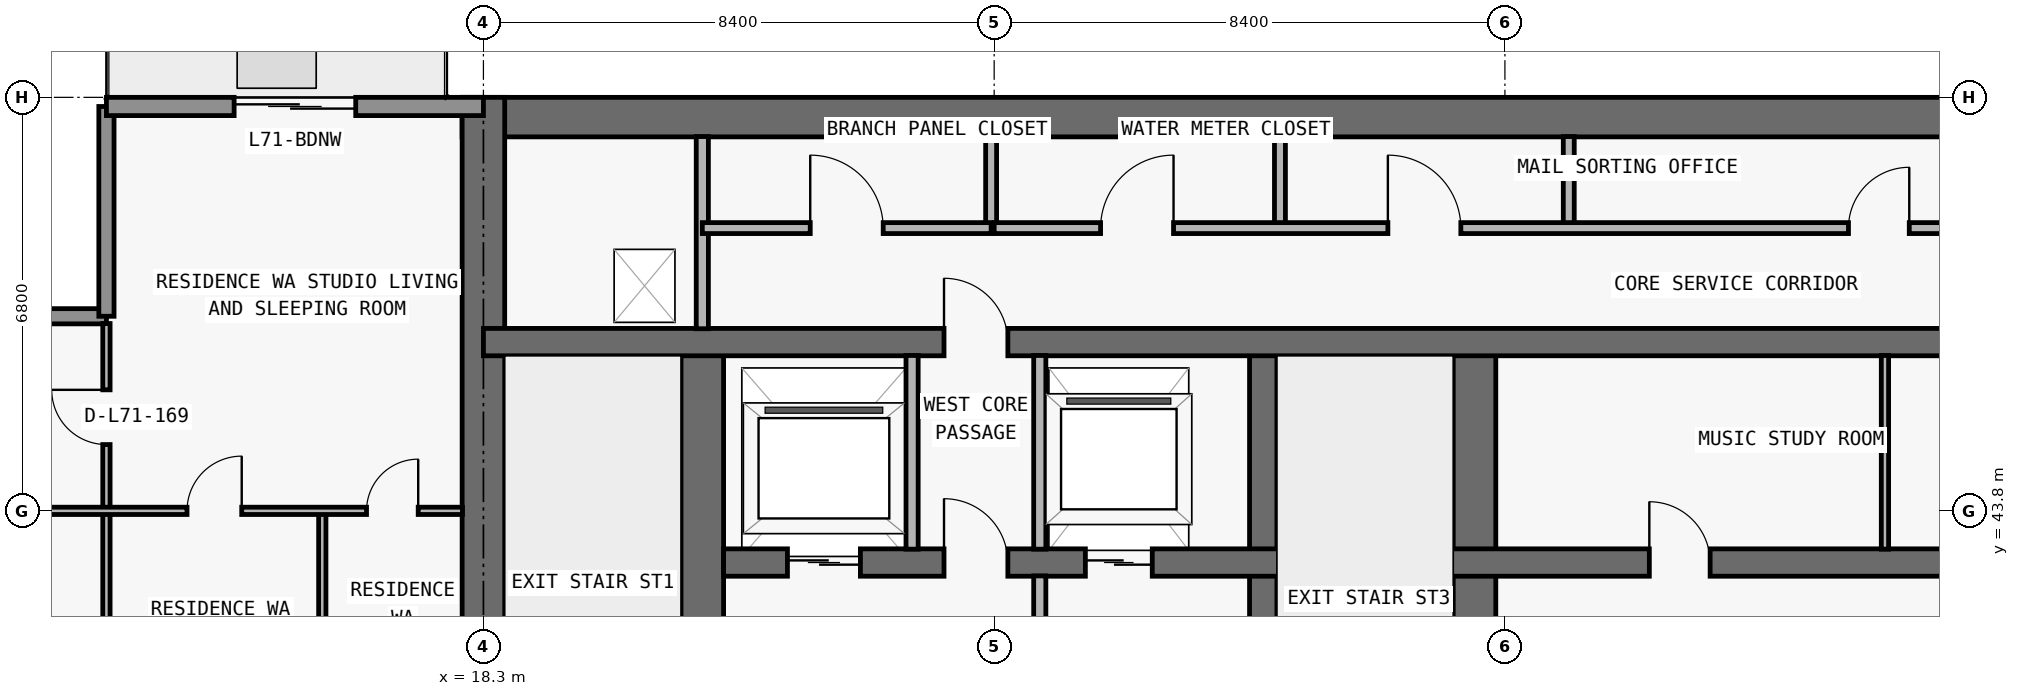
"""IFC4 building model, lengths in metres.
Left out: names, types, materials, properties, quantities, classifications, styles, units other than length and angle.
Written with IfcOpenShell. Run it as: python <this file> out.ifc"""

import sys

from ifc_helpers import new_model, si_unit, direction, frame, frame_2d, origin, place, context, subcontext, project, spatial, rectangle, extrude, element, fill, save


model = new_model("IFC4")
c1 = context("Model", 3, precision=1e-05, world=origin(), true_north=direction((0.0, 1.0)))
c2 = subcontext(c1, "Body", "Model", "MODEL_VIEW")
j1 = project(units=[si_unit("LENGTHUNIT", "METRE"), si_unit("PLANEANGLEUNIT", "RADIAN")], contexts=[c1])
p1 = place(None, origin())
s1 = spatial("IfcSite", under=j1, at=p1, CompositionType="ELEMENT")
p2 = place(p1, origin())
s2 = spatial("IfcBuilding", under=s1, at=p2, CompositionType="ELEMENT")
p3 = place(p2, frame((0.0, 0.0, 252.9)))
s3 = spatial("IfcBuildingStorey", under=s2, at=p3, CompositionType="ELEMENT", Elevation=252.9)
p4 = place(p3, frame((17.95, 50.275, 0.0), z_axis=(0.0, 0.0, 1.0), x_axis=(1.0, 0.0, 0.0)))
e1 = element("IfcWall", 1, at=p4, inside=s3, PredefinedType="SHEAR", context=c2, shape_type="SweptSolid", body=[
    extrude(rectangle(XDim=41.9, YDim=0.65, at=frame_2d((20.95, 0.0))), origin(), (0.0, 0.0, 1.0), 3.05),
])
p5 = place(p3, frame((18.3, 36.65, 0.0), z_axis=(0.0, 0.0, 1.0), x_axis=(0.0, 1.0, 0.0)))
e2 = element("IfcWall", 2, at=p5, inside=s3, PredefinedType="SHEAR", context=c2, shape_type="SweptSolid", body=[
    extrude(rectangle(XDim=13.95, YDim=0.7, at=frame_2d((6.975, 0.0))), origin(), (0.0, 0.0, 1.0), 3.05),
])
p6 = place(p3, frame((21.9, 37.0, 0.0), z_axis=(0.0, 0.0, 1.0), x_axis=(0.0, 1.0, 0.0)))
e3 = element("IfcWall", 3, at=p6, inside=s3, PredefinedType="SHEAR", context=c2, shape_type="SweptSolid", body=[
    extrude(rectangle(XDim=9.575, YDim=0.7, at=frame_2d((4.788, 0.0))), origin(), (0.0, 0.0, 1.0), 3.05),
])
p7 = place(p6, frame((0.55, 0.0, 0.0)))
e4 = element("IfcOpeningElement", 4, at=p7, cuts=e3, PredefinedType="OPENING", context=c2, shape_type="SweptSolid", body=[
    extrude(rectangle(XDim=1.1, YDim=2.15, at=frame_2d((0.55, 1.075))), frame((0.0, 0.36, 0.0), z_axis=(0.0, -1.0, 0.0), x_axis=(1.0, 0.0, 0.0)), (0.0, 0.0, 1.0), 0.72),
])
p8 = place(p3, frame((31.125, 37.0, 0.0), z_axis=(0.0, 0.0, 1.0), x_axis=(0.0, 1.0, 0.0)))
e5 = element("IfcWall", 5, at=p8, inside=s3, PredefinedType="SHEAR", context=c2, shape_type="SweptSolid", body=[
    extrude(rectangle(XDim=9.575, YDim=0.45, at=frame_2d((4.788, 0.0))), origin(), (0.0, 0.0, 1.0), 3.05),
])
p9 = place(p3, frame((34.6, 37.0, 0.0), z_axis=(0.0, 0.0, 1.0), x_axis=(0.0, 1.0, 0.0)))
e6 = element("IfcWall", 6, at=p9, inside=s3, PredefinedType="SHEAR", context=c2, shape_type="SweptSolid", body=[
    extrude(rectangle(XDim=9.575, YDim=0.7, at=frame_2d((4.788, 0.0))), origin(), (0.0, 0.0, 1.0), 3.05),
])
p10 = place(p3, frame((22.25, 42.95, 0.0), z_axis=(0.0, 0.0, 1.0), x_axis=(1.0, 0.0, 0.0)))
e7 = element("IfcWall", 7, at=p10, inside=s3, PredefinedType="SHEAR", context=c2, shape_type="SweptSolid", body=[
    extrude(rectangle(XDim=33.3, YDim=0.45, at=frame_2d((16.65, 0.0))), origin(), (0.0, 0.0, 1.0), 3.05),
])
p11 = place(p10, frame((1.05, 0.0, 0.0)))
e8 = element("IfcOpeningElement", 8, at=p11, cuts=e7, PredefinedType="OPENING", context=c2, shape_type="SweptSolid", body=[
    extrude(rectangle(XDim=1.2, YDim=2.2, at=frame_2d((0.6, 1.1))), frame((0.0, 0.235, 0.0), z_axis=(0.0, -1.0, 0.0), x_axis=(1.0, 0.0, 0.0)), (0.0, 0.0, 1.0), 0.47),
])
p12 = place(p10, frame((31.05, 0.0, 0.0)))
e9 = element("IfcOpeningElement", 9, at=p12, cuts=e7, PredefinedType="OPENING", context=c2, shape_type="SweptSolid", body=[
    extrude(rectangle(XDim=1.2, YDim=2.2, at=frame_2d((0.6, 1.1))), frame((0.0, 0.235, 0.0), z_axis=(0.0, -1.0, 0.0), x_axis=(1.0, 0.0, 0.0)), (0.0, 0.0, 1.0), 0.47),
])
p13 = place(p10, frame((26.45, 0.0, 0.0)))
e10 = element("IfcOpeningElement", 10, at=p13, cuts=e7, PredefinedType="OPENING", context=c2, shape_type="SweptSolid", body=[
    extrude(rectangle(XDim=1.1, YDim=2.2, at=frame_2d((0.55, 1.1))), frame((0.0, 0.235, 0.0), z_axis=(0.0, -1.0, 0.0), x_axis=(1.0, 0.0, 0.0)), (0.0, 0.0, 1.0), 0.47),
])
p14 = place(p10, frame((5.95, 0.0, 0.0)))
e11 = element("IfcOpeningElement", 11, at=p14, cuts=e7, PredefinedType="OPENING", context=c2, shape_type="SweptSolid", body=[
    extrude(rectangle(XDim=1.1, YDim=2.2, at=frame_2d((0.55, 1.1))), frame((0.0, 0.235, 0.0), z_axis=(0.0, -1.0, 0.0), x_axis=(1.0, 0.0, 0.0)), (0.0, 0.0, 1.0), 0.47),
])
p15 = place(p10, frame((3.625, 0.0, 0.0)))
e12 = element("IfcOpeningElement", 12, at=p15, cuts=e7, PredefinedType="OPENING", context=c2, shape_type="SweptSolid", body=[
    extrude(rectangle(XDim=1.05, YDim=2.15, at=frame_2d((0.525, 1.075))), frame((0.0, 0.235, 0.0), z_axis=(0.0, -1.0, 0.0), x_axis=(1.0, 0.0, 0.0)), (0.0, 0.0, 1.0), 0.47),
])
p16 = place(p10, frame((28.675, 0.0, 0.0)))
e13 = element("IfcOpeningElement", 13, at=p16, cuts=e7, PredefinedType="OPENING", context=c2, shape_type="SweptSolid", body=[
    extrude(rectangle(XDim=1.05, YDim=2.15, at=frame_2d((0.525, 1.075))), frame((0.0, 0.235, 0.0), z_axis=(0.0, -1.0, 0.0), x_axis=(1.0, 0.0, 0.0)), (0.0, 0.0, 1.0), 0.47),
])
p17 = place(p10, frame((15.225, 0.0, 0.0)))
e14 = element("IfcOpeningElement", 14, at=p17, cuts=e7, PredefinedType="OPENING", context=c2, shape_type="SweptSolid", body=[
    extrude(rectangle(XDim=1.0, YDim=2.2, at=frame_2d((0.5, 1.1))), frame((0.0, 0.235, 0.0), z_axis=(0.0, -1.0, 0.0), x_axis=(1.0, 0.0, 0.0)), (0.0, 0.0, 1.0), 0.47),
])
p18 = place(p10, frame((21.975, 0.0, 0.0)))
e15 = element("IfcOpeningElement", 15, at=p18, cuts=e7, PredefinedType="OPENING", context=c2, shape_type="SweptSolid", body=[
    extrude(rectangle(XDim=1.0, YDim=2.2, at=frame_2d((0.5, 1.1))), frame((0.0, 0.235, 0.0), z_axis=(0.0, -1.0, 0.0), x_axis=(1.0, 0.0, 0.0)), (0.0, 0.0, 1.0), 0.47),
])
p19 = place(p3, frame((18.3, 46.575, 0.0), z_axis=(0.0, 0.0, 1.0), x_axis=(1.0, 0.0, 0.0)))
e16 = element("IfcWall", 16, at=p19, inside=s3, PredefinedType="SHEAR", context=c2, shape_type="SweptSolid", body=[
    extrude(rectangle(XDim=41.2, YDim=0.45, at=frame_2d((20.6, 0.0))), origin(), (0.0, 0.0, 1.0), 3.05),
])
p20 = place(p19, frame((7.575, 0.0, 0.0)))
e17 = element("IfcOpeningElement", 17, at=p20, cuts=e16, PredefinedType="OPENING", context=c2, shape_type="SweptSolid", body=[
    extrude(rectangle(XDim=1.05, YDim=2.15, at=frame_2d((0.525, 1.075))), frame((0.0, 0.235, 0.0), z_axis=(0.0, -1.0, 0.0), x_axis=(1.0, 0.0, 0.0)), (0.0, 0.0, 1.0), 0.47),
])
p21 = place(p19, frame((32.625, 0.0, 0.0)))
e18 = element("IfcOpeningElement", 18, at=p21, cuts=e16, PredefinedType="OPENING", context=c2, shape_type="SweptSolid", body=[
    extrude(rectangle(XDim=1.05, YDim=2.15, at=frame_2d((0.525, 1.075))), frame((0.0, 0.235, 0.0), z_axis=(0.0, -1.0, 0.0), x_axis=(1.0, 0.0, 0.0)), (0.0, 0.0, 1.0), 0.47),
])
p22 = place(p3, frame((8.25, 47.0, 0.0), z_axis=(0.0, 0.0, 1.0), x_axis=(1.0, 0.0, 0.0)))
e19 = element("IfcWall", 19, at=p22, inside=s3, PredefinedType="ELEMENTEDWALL", context=c2, shape_type="SweptSolid", body=[
    extrude(rectangle(XDim=3.85, YDim=0.25, at=frame_2d((1.925, 0.0))), origin(), (0.0, 0.0, 1.0), 3.05),
])
p23 = place(p3, frame((12.1, 47.0, 0.0), z_axis=(0.0, 0.0, 1.0), x_axis=(0.0, 1.0, 0.0)))
e20 = element("IfcWall", 20, at=p23, inside=s3, PredefinedType="ELEMENTEDWALL", context=c2, shape_type="SweptSolid", body=[
    extrude(rectangle(XDim=3.45, YDim=0.25, at=frame_2d((1.725, 0.0))), origin(), (0.0, 0.0, 1.0), 3.05),
])
p24 = place(p3, frame((12.1, 50.45, 0.0), z_axis=(0.0, 0.0, 1.0), x_axis=(1.0, 0.0, 0.0)))
e21 = element("IfcWall", 21, at=p24, inside=s3, PredefinedType="STANDARD", context=c2, shape_type="SweptSolid", body=[
    extrude(rectangle(XDim=6.2, YDim=0.3, at=frame_2d((3.1, 0.0))), origin(), (0.0, 0.0, 1.0), 3.05),
])
p25 = place(p24, frame((2.1, 0.0, 0.0)))
e22 = element("IfcOpeningElement", 22, at=p25, cuts=e21, PredefinedType="OPENING", context=c2, shape_type="SweptSolid", body=[
    extrude(rectangle(XDim=2.0, YDim=2.3, at=frame_2d((1.0, 1.15))), frame((0.0, 0.16, 0.0), z_axis=(0.0, -1.0, 0.0), x_axis=(1.0, 0.0, 0.0)), (0.0, 0.0, 1.0), 0.32),
])
p26 = place(p3, frame((12.1, 37.005, 0.0), z_axis=(0.0, 0.0, 1.0), x_axis=(0.0, 1.0, 0.0)))
e23 = element("IfcWall", 23, at=p26, inside=s3, PredefinedType="PARTITIONING", context=c2, shape_type="SweptSolid", body=[
    extrude(rectangle(XDim=9.875, YDim=0.12, at=frame_2d((4.938, 0.0))), origin(), (0.0, 0.0, 1.0), 3.05),
])
p27 = place(p26, frame((2.948, 0.0, 0.0)))
e24 = element("IfcOpeningElement", 24, at=p27, cuts=e23, PredefinedType="OPENING", context=c2, shape_type="SweptSolid", body=[
    extrude(rectangle(XDim=0.9, YDim=2.15, at=frame_2d((0.45, 1.075))), frame((0.0, 0.07, 0.0), z_axis=(0.0, -1.0, 0.0), x_axis=(1.0, 0.0, 0.0)), (0.0, 0.0, 1.0), 0.14),
])
p28 = place(p26, frame((7.885, 0.0, 0.0)))
e25 = element("IfcOpeningElement", 25, at=p28, cuts=e23, PredefinedType="OPENING", context=c2, shape_type="SweptSolid", body=[
    extrude(rectangle(XDim=0.9, YDim=2.15, at=frame_2d((0.45, 1.075))), frame((0.0, 0.07, 0.0), z_axis=(0.0, -1.0, 0.0), x_axis=(1.0, 0.0, 0.0)), (0.0, 0.0, 1.0), 0.14),
])
p29 = place(p3, frame((15.65, 37.0, 0.0), z_axis=(0.0, 0.0, 1.0), x_axis=(0.0, 1.0, 0.0)))
e26 = element("IfcWall", 26, at=p29, inside=s3, PredefinedType="PARTITIONING", context=c2, shape_type="SweptSolid", body=[
    extrude(rectangle(XDim=6.8, YDim=0.12, at=frame_2d((3.4, 0.0))), origin(), (0.0, 0.0, 1.0), 3.05),
])
p30 = place(p29, frame((1.207, 0.0, 0.0)))
e27 = element("IfcOpeningElement", 27, at=p30, cuts=e26, PredefinedType="OPENING", context=c2, shape_type="SweptSolid", body=[
    extrude(rectangle(XDim=0.85, YDim=2.1, at=frame_2d((0.425, 1.05))), frame((0.0, 0.07, 0.0), z_axis=(0.0, -1.0, 0.0), x_axis=(1.0, 0.0, 0.0)), (0.0, 0.0, 1.0), 0.14),
])
p31 = place(p3, frame((21.9, 46.795, 0.0), z_axis=(0.0, 0.0, 1.0), x_axis=(0.0, 1.0, 0.0)))
e28 = element("IfcWall", 28, at=p31, inside=s3, PredefinedType="PARTITIONING", context=c2, shape_type="SweptSolid", body=[
    extrude(rectangle(XDim=3.16, YDim=0.2, at=frame_2d((1.58, 0.0))), origin(), (0.0, 0.0, 1.0), 3.05),
])
p32 = place(p3, frame((25.35, 43.17, 0.0), z_axis=(0.0, 0.0, 1.0), x_axis=(0.0, 1.0, 0.0)))
e29 = element("IfcWall", 29, at=p32, inside=s3, PredefinedType="PARTITIONING", context=c2, shape_type="SweptSolid", body=[
    extrude(rectangle(XDim=3.185, YDim=0.2, at=frame_2d((1.593, 0.0))), origin(), (0.0, 0.0, 1.0), 3.05),
])
p33 = place(p3, frame((26.65, 48.45, 0.0), z_axis=(0.0, 0.0, 1.0), x_axis=(0.0, 1.0, 0.0)))
e30 = element("IfcWall", 30, at=p33, inside=s3, PredefinedType="PARTITIONING", context=c2, shape_type="SweptSolid", body=[
    extrude(rectangle(XDim=1.505, YDim=0.18, at=frame_2d((0.752, 0.0))), origin(), (0.0, 0.0, 1.0), 3.05),
])
p34 = place(p3, frame((27.45, 37.345, 0.0), z_axis=(0.0, 0.0, 1.0), x_axis=(0.0, 1.0, 0.0)))
e31 = element("IfcWall", 31, at=p34, inside=s3, PredefinedType="PARTITIONING", context=c2, shape_type="SweptSolid", body=[
    extrude(rectangle(XDim=5.385, YDim=0.2, at=frame_2d((2.692, 0.0))), origin(), (0.0, 0.0, 1.0), 3.05),
])
p35 = place(p3, frame((27.45, 43.17, 0.0), z_axis=(0.0, 0.0, 1.0), x_axis=(0.0, 1.0, 0.0)))
e32 = element("IfcWall", 32, at=p35, inside=s3, PredefinedType="PARTITIONING", context=c2, shape_type="SweptSolid", body=[
    extrude(rectangle(XDim=3.185, YDim=0.2, at=frame_2d((1.593, 0.0))), origin(), (0.0, 0.0, 1.0), 3.05),
])
for number, where, z_axis, x_axis in (
    (33, (31.4, 48.45, 0.0), (0.0, 0.0, 1.0), (0.0, 1.0, 0.0)),
    (34, (36.15, 48.45, 0.0), (0.0, 0.0, 1.0), (0.0, 1.0, 0.0)),
):
    element("IfcWall", number, at=place(p3, frame(where, z_axis=z_axis, x_axis=x_axis)), inside=s3, PredefinedType="PARTITIONING", context=c2, shape_type="SweptSolid", body=[
        extrude(rectangle(XDim=1.505, YDim=0.18, at=frame_2d((0.752, 0.0))), origin(), (0.0, 0.0, 1.0), 3.05),
    ])
p36 = place(p3, frame((41.35, 43.17, 0.0), z_axis=(0.0, 0.0, 1.0), x_axis=(0.0, 1.0, 0.0)))
e35 = element("IfcWall", 35, at=p36, inside=s3, PredefinedType="PARTITIONING", context=c2, shape_type="SweptSolid", body=[
    extrude(rectangle(XDim=3.185, YDim=0.12, at=frame_2d((1.593, 0.0))), origin(), (0.0, 0.0, 1.0), 3.05),
])
p37 = place(p3, frame((8.395, 43.8, 0.0), z_axis=(0.0, 0.0, 1.0), x_axis=(1.0, 0.0, 0.0)))
e36 = element("IfcWall", 36, at=p37, inside=s3, PredefinedType="PARTITIONING", context=c2, shape_type="SweptSolid", body=[
    extrude(rectangle(XDim=9.56, YDim=0.12, at=frame_2d((4.78, 0.0))), origin(), (0.0, 0.0, 1.0), 2.418),
])
p38 = place(p37, frame((5.03, 0.0, 0.0)))
e37 = element("IfcOpeningElement", 37, at=p38, cuts=e36, PredefinedType="OPENING", context=c2, shape_type="SweptSolid", body=[
    extrude(rectangle(XDim=0.9, YDim=2.15, at=frame_2d((0.45, 1.075))), frame((0.0, 0.07, 0.0), z_axis=(0.0, -1.0, 0.0), x_axis=(1.0, 0.0, 0.0)), (0.0, 0.0, 1.0), 0.14),
])
p39 = place(p37, frame((7.982, 0.0, 0.0)))
e38 = element("IfcOpeningElement", 38, at=p39, cuts=e36, PredefinedType="OPENING", context=c2, shape_type="SweptSolid", body=[
    extrude(rectangle(XDim=0.85, YDim=2.1, at=frame_2d((0.425, 1.05))), frame((0.0, 0.07, 0.0), z_axis=(0.0, -1.0, 0.0), x_axis=(1.0, 0.0, 0.0)), (0.0, 0.0, 1.0), 0.14),
])
p40 = place(p3, frame((21.9, 48.45, 0.0), z_axis=(0.0, 0.0, 1.0), x_axis=(1.0, 0.0, 0.0)))
e39 = element("IfcWall", 39, at=p40, inside=s3, PredefinedType="PARTITIONING", context=c2, shape_type="SweptSolid", body=[
    extrude(rectangle(XDim=4.75, YDim=0.18, at=frame_2d((2.375, 0.0))), origin(), (0.0, 0.0, 1.0), 3.05),
])
p41 = place(p40, frame((1.775, 0.0, 0.0)))
e40 = element("IfcOpeningElement", 40, at=p41, cuts=e39, PredefinedType="OPENING", context=c2, shape_type="SweptSolid", body=[
    extrude(rectangle(XDim=1.2, YDim=2.2, at=frame_2d((0.6, 1.1))), frame((0.0, 0.1, 0.0), z_axis=(0.0, -1.0, 0.0), x_axis=(1.0, 0.0, 0.0)), (0.0, 0.0, 1.0), 0.2),
])
p42 = place(p3, frame((26.7, 48.45, 0.0), z_axis=(0.0, 0.0, 1.0), x_axis=(1.0, 0.0, 0.0)))
e41 = element("IfcWall", 41, at=p42, inside=s3, PredefinedType="PARTITIONING", context=c2, shape_type="SweptSolid", body=[
    extrude(rectangle(XDim=29.2, YDim=0.18, at=frame_2d((14.6, 0.0))), origin(), (0.0, 0.0, 1.0), 3.05),
])
p43 = place(p42, frame((1.75, 0.0, 0.0)))
e42 = element("IfcOpeningElement", 42, at=p43, cuts=e41, PredefinedType="OPENING", context=c2, shape_type="SweptSolid", body=[
    extrude(rectangle(XDim=1.2, YDim=2.2, at=frame_2d((0.6, 1.1))), frame((0.0, 0.1, 0.0), z_axis=(0.0, -1.0, 0.0), x_axis=(1.0, 0.0, 0.0)), (0.0, 0.0, 1.0), 0.2),
])
p44 = place(p42, frame((6.475, 0.0, 0.0)))
e43 = element("IfcOpeningElement", 43, at=p44, cuts=e41, PredefinedType="OPENING", context=c2, shape_type="SweptSolid", body=[
    extrude(rectangle(XDim=1.2, YDim=2.2, at=frame_2d((0.6, 1.1))), frame((0.0, 0.1, 0.0), z_axis=(0.0, -1.0, 0.0), x_axis=(1.0, 0.0, 0.0)), (0.0, 0.0, 1.0), 0.2),
])
p45 = place(p42, frame((14.05, 0.0, 0.0)))
e44 = element("IfcOpeningElement", 44, at=p45, cuts=e41, PredefinedType="OPENING", context=c2, shape_type="SweptSolid", body=[
    extrude(rectangle(XDim=1.0, YDim=2.2, at=frame_2d((0.5, 1.1))), frame((0.0, 0.1, 0.0), z_axis=(0.0, -1.0, 0.0), x_axis=(1.0, 0.0, 0.0)), (0.0, 0.0, 1.0), 0.2),
])
p46 = place(p42, frame((21.425, 0.0, 0.0)))
e45 = element("IfcOpeningElement", 45, at=p46, cuts=e41, PredefinedType="OPENING", context=c2, shape_type="SweptSolid", body=[
    extrude(rectangle(XDim=1.2, YDim=2.2, at=frame_2d((0.6, 1.1))), frame((0.0, 0.1, 0.0), z_axis=(0.0, -1.0, 0.0), x_axis=(1.0, 0.0, 0.0)), (0.0, 0.0, 1.0), 0.2),
])
p47 = place(p42, frame((26.375, 0.0, 0.0)))
e46 = element("IfcOpeningElement", 46, at=p47, cuts=e41, PredefinedType="OPENING", context=c2, shape_type="SweptSolid", body=[
    extrude(rectangle(XDim=0.85, YDim=2.1, at=frame_2d((0.425, 1.05))), frame((0.0, 0.1, 0.0), z_axis=(0.0, -1.0, 0.0), x_axis=(1.0, 0.0, 0.0)), (0.0, 0.0, 1.0), 0.2),
])
p48 = place(p25, origin())
e47 = element("IfcDoor", 47, at=p48, inside=s3, OperationType="DOUBLE_DOOR_SLIDING", PredefinedType="DOOR", context=c2, shape_type="SweptSolid", body=[
    extrude(rectangle(XDim=2.0, YDim=2.3, at=frame_2d((1.0, 1.15))), frame((0.0, 0.025, 0.0), z_axis=(0.0, -1.0, 0.0), x_axis=(1.0, 0.0, 0.0)), (0.0, 0.0, 1.0), 0.05),
])
fill(e22, e47)
p49 = place(p11, origin())
e48 = element("IfcDoor", 48, at=p49, inside=s3, OperationType="DOUBLE_DOOR_SLIDING", PredefinedType="DOOR", context=c2, shape_type="SweptSolid", body=[
    extrude(rectangle(XDim=1.2, YDim=2.2, at=frame_2d((0.6, 1.1))), frame((0.0, 0.025, 0.0), z_axis=(0.0, -1.0, 0.0), x_axis=(1.0, 0.0, 0.0)), (0.0, 0.0, 1.0), 0.05),
])
fill(e8, e48)
p50 = place(p14, origin())
e49 = element("IfcDoor", 49, at=p50, inside=s3, OperationType="DOUBLE_DOOR_SLIDING", PredefinedType="DOOR", context=c2, shape_type="SweptSolid", body=[
    extrude(rectangle(XDim=1.1, YDim=2.2, at=frame_2d((0.55, 1.1))), frame((0.0, 0.025, 0.0), z_axis=(0.0, -1.0, 0.0), x_axis=(1.0, 0.0, 0.0)), (0.0, 0.0, 1.0), 0.05),
])
fill(e11, e49)
p51 = place(p15, origin())
e50 = element("IfcDoor", 50, at=p51, inside=s3, OperationType="SINGLE_SWING_LEFT", PredefinedType="DOOR", context=c2, shape_type="SweptSolid", body=[
    extrude(rectangle(XDim=1.05, YDim=2.15, at=frame_2d((0.525, 1.075))), frame((0.0, 0.025, 0.0), z_axis=(0.0, -1.0, 0.0), x_axis=(1.0, 0.0, 0.0)), (0.0, 0.0, 1.0), 0.05),
])
fill(e12, e50)
p52 = place(p17, origin())
e51 = element("IfcDoor", 51, at=p52, inside=s3, OperationType="SINGLE_SWING_LEFT", PredefinedType="DOOR", context=c2, shape_type="SweptSolid", body=[
    extrude(rectangle(XDim=1.0, YDim=2.2, at=frame_2d((0.5, 1.1))), frame((0.0, 0.025, 0.0), z_axis=(0.0, -1.0, 0.0), x_axis=(1.0, 0.0, 0.0)), (0.0, 0.0, 1.0), 0.05),
])
fill(e14, e51)
p53 = place(p20, origin())
e52 = element("IfcDoor", 52, at=p53, inside=s3, OperationType="SINGLE_SWING_LEFT", PredefinedType="DOOR", context=c2, shape_type="SweptSolid", body=[
    extrude(rectangle(XDim=1.05, YDim=2.15, at=frame_2d((0.525, 1.075))), frame((0.0, 0.025, 0.0), z_axis=(0.0, -1.0, 0.0), x_axis=(1.0, 0.0, 0.0)), (0.0, 0.0, 1.0), 0.05),
])
fill(e17, e52)
p54 = place(p41, origin())
e53 = element("IfcDoor", 53, at=p54, inside=s3, OperationType="SINGLE_SWING_LEFT", PredefinedType="DOOR", context=c2, shape_type="SweptSolid", body=[
    extrude(rectangle(XDim=1.2, YDim=2.2, at=frame_2d((0.6, 1.1))), frame((0.0, 0.025, 0.0), z_axis=(0.0, -1.0, 0.0), x_axis=(1.0, 0.0, 0.0)), (0.0, 0.0, 1.0), 0.05),
])
fill(e40, e53)
p55 = place(p43, origin())
e54 = element("IfcDoor", 54, at=p55, inside=s3, OperationType="SINGLE_SWING_RIGHT", PredefinedType="DOOR", context=c2, shape_type="SweptSolid", body=[
    extrude(rectangle(XDim=1.2, YDim=2.2, at=frame_2d((0.6, 1.1))), frame((0.0, 0.025, 0.0), z_axis=(0.0, -1.0, 0.0), x_axis=(1.0, 0.0, 0.0)), (0.0, 0.0, 1.0), 0.05),
])
fill(e42, e54)
p56 = place(p44, origin())
e55 = element("IfcDoor", 55, at=p56, inside=s3, OperationType="SINGLE_SWING_LEFT", PredefinedType="DOOR", context=c2, shape_type="SweptSolid", body=[
    extrude(rectangle(XDim=1.2, YDim=2.2, at=frame_2d((0.6, 1.1))), frame((0.0, 0.025, 0.0), z_axis=(0.0, -1.0, 0.0), x_axis=(1.0, 0.0, 0.0)), (0.0, 0.0, 1.0), 0.05),
])
fill(e43, e55)
p57 = place(p45, origin())
e56 = element("IfcDoor", 56, at=p57, inside=s3, OperationType="SINGLE_SWING_RIGHT", PredefinedType="DOOR", context=c2, shape_type="SweptSolid", body=[
    extrude(rectangle(XDim=1.0, YDim=2.2, at=frame_2d((0.5, 1.1))), frame((0.0, 0.025, 0.0), z_axis=(0.0, -1.0, 0.0), x_axis=(1.0, 0.0, 0.0)), (0.0, 0.0, 1.0), 0.05),
])
fill(e44, e56)
p58 = place(p38, origin())
e57 = element("IfcDoor", 57, at=p58, inside=s3, OperationType="SINGLE_SWING_RIGHT", PredefinedType="DOOR", context=c2, shape_type="SweptSolid", body=[
    extrude(rectangle(XDim=0.9, YDim=2.15, at=frame_2d((0.45, 1.075))), frame((0.0, 0.025, 0.0), z_axis=(0.0, -1.0, 0.0), x_axis=(1.0, 0.0, 0.0)), (0.0, 0.0, 1.0), 0.05),
])
fill(e37, e57)
p59 = place(p39, origin())
e58 = element("IfcDoor", 58, at=p59, inside=s3, OperationType="SINGLE_SWING_RIGHT", PredefinedType="DOOR", context=c2, shape_type="SweptSolid", body=[
    extrude(rectangle(XDim=0.85, YDim=2.1, at=frame_2d((0.425, 1.05))), frame((0.0, 0.025, 0.0), z_axis=(0.0, -1.0, 0.0), x_axis=(1.0, 0.0, 0.0)), (0.0, 0.0, 1.0), 0.05),
])
fill(e38, e58)
p60 = place(p28, origin())
e59 = element("IfcDoor", 59, at=p60, inside=s3, OperationType="SINGLE_SWING_RIGHT", PredefinedType="DOOR", context=c2, shape_type="SweptSolid", body=[
    extrude(rectangle(XDim=0.9, YDim=2.15, at=frame_2d((0.45, 1.075))), frame((0.0, 0.025, 0.0), z_axis=(0.0, -1.0, 0.0), x_axis=(1.0, 0.0, 0.0)), (0.0, 0.0, 1.0), 0.05),
])
fill(e25, e59)
save(model, sys.argv[1])
